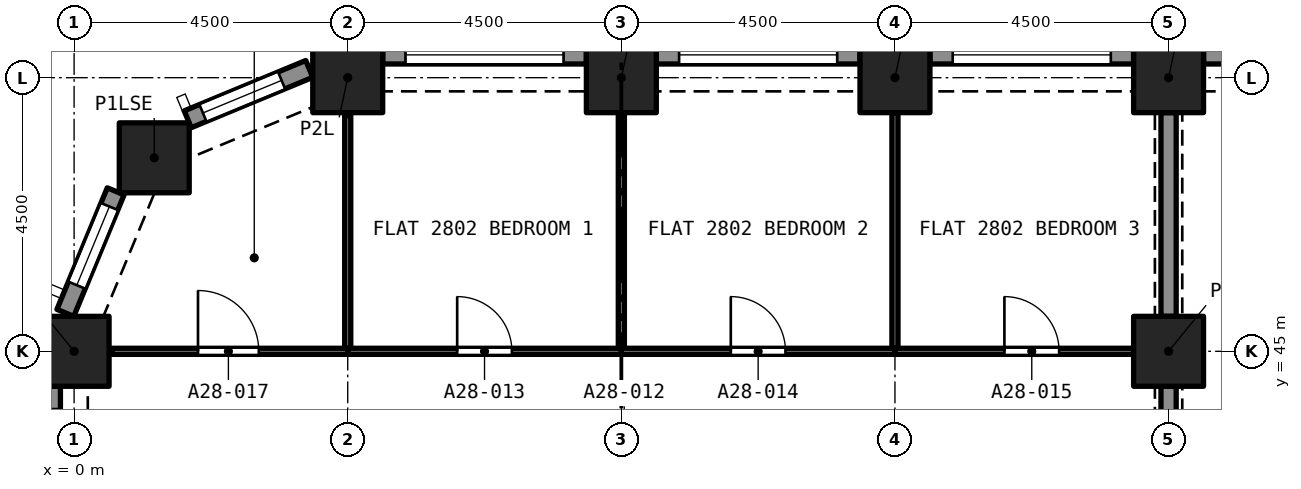
"""IFC4 building model, lengths in metres.
Left out: names, types, materials, properties, quantities, classifications, styles, units other than length and angle.
Written with IfcOpenShell. Run it as: python <this file> out.ifc"""

import sys

from ifc_helpers import new_model, si_unit, direction, frame, frame_2d, origin, origin_2d, place, context, subcontext, project, spatial, rectangle, extrude, element, fill, save


model = new_model("IFC4")
c1 = context("Model", 3, precision=1e-05, world=origin(), true_north=direction((0.0, 1.0)))
c2 = subcontext(c1, "Body", "Model", "MODEL_VIEW")
j1 = project(units=[si_unit("LENGTHUNIT", "METRE"), si_unit("PLANEANGLEUNIT", "RADIAN")], contexts=[c1])
p1 = place(None, origin())
s1 = spatial("IfcSite", under=j1, at=p1, CompositionType="ELEMENT")
p2 = place(p1, origin())
s2 = spatial("IfcBuilding", under=s1, at=p2, CompositionType="ELEMENT")
p3 = place(p2, frame((0.0, 0.0, 102.4)))
s3 = spatial("IfcBuildingStorey", under=s2, at=p3, CompositionType="ELEMENT", Elevation=102.4)
for number, where, z_axis, x_axis in (
    (1, (0.0, 45.0, 0.0), (0.0, 0.0, 1.0), (1.0, 0.0, 0.0)),
    (2, (18.0, 45.0, 0.0), (0.0, 0.0, 1.0), (1.0, 0.0, 0.0)),
    (3, (1.318, 48.182, 0.0), (0.0, 0.0, 1.0), (1.0, 0.0, 0.0)),
    (4, (4.5, 49.5, 0.0), (0.0, 0.0, 1.0), (1.0, 0.0, 0.0)),
    (5, (9.0, 49.5, 0.0), (0.0, 0.0, 1.0), (1.0, 0.0, 0.0)),
    (6, (13.5, 49.5, 0.0), (0.0, 0.0, 1.0), (1.0, 0.0, 0.0)),
    (7, (18.0, 49.5, 0.0), (0.0, 0.0, 1.0), (1.0, 0.0, 0.0)),
):
    element("IfcColumn", number, at=place(p3, frame(where, z_axis=z_axis, x_axis=x_axis)), inside=s3, PredefinedType="COLUMN", context=c2, shape_type="SweptSolid", body=[
        extrude(rectangle(XDim=1.15, YDim=1.15, at=origin_2d()), origin(), (0.0, 0.0, 1.0), 3.2),
    ])
p4 = place(p3, frame((18.575, 49.875, 0.0), z_axis=(0.0, 0.0, 1.0), x_axis=(1.0, 0.0, 0.0)))
e8 = element("IfcWall", 8, at=p4, inside=s3, PredefinedType="SOLIDWALL", context=c2, shape_type="SweptSolid", body=[
    extrude(rectangle(XDim=3.35, YDim=0.3, at=frame_2d((1.675, 0.0))), origin(), (0.0, 0.0, 1.0), 3.2),
])
p5 = place(p4, frame((0.375, 0.0, 0.45)))
e9 = element("IfcOpeningElement", 9, at=p5, cuts=e8, PredefinedType="OPENING", context=c2, shape_type="SweptSolid", body=[
    extrude(rectangle(XDim=2.6, YDim=1.95, at=frame_2d((1.3, 0.975))), frame((0.0, 0.16, 0.0), z_axis=(0.0, -1.0, 0.0), x_axis=(1.0, 0.0, 0.0)), (0.0, 0.0, 1.0), 0.32),
])
p6 = place(p3, frame((14.075, 49.875, 0.0), z_axis=(0.0, 0.0, 1.0), x_axis=(1.0, 0.0, 0.0)))
e10 = element("IfcWall", 10, at=p6, inside=s3, PredefinedType="SOLIDWALL", context=c2, shape_type="SweptSolid", body=[
    extrude(rectangle(XDim=3.35, YDim=0.3, at=frame_2d((1.675, 0.0))), origin(), (0.0, 0.0, 1.0), 3.2),
])
p7 = place(p6, frame((0.375, 0.0, 0.45)))
e11 = element("IfcOpeningElement", 11, at=p7, cuts=e10, PredefinedType="OPENING", context=c2, shape_type="SweptSolid", body=[
    extrude(rectangle(XDim=2.6, YDim=1.95, at=frame_2d((1.3, 0.975))), frame((0.0, 0.16, 0.0), z_axis=(0.0, -1.0, 0.0), x_axis=(1.0, 0.0, 0.0)), (0.0, 0.0, 1.0), 0.32),
])
p8 = place(p3, frame((9.575, 49.875, 0.0), z_axis=(0.0, 0.0, 1.0), x_axis=(1.0, 0.0, 0.0)))
e12 = element("IfcWall", 12, at=p8, inside=s3, PredefinedType="SOLIDWALL", context=c2, shape_type="SweptSolid", body=[
    extrude(rectangle(XDim=3.35, YDim=0.3, at=frame_2d((1.675, 0.0))), origin(), (0.0, 0.0, 1.0), 3.2),
])
p9 = place(p8, frame((0.375, 0.0, 0.45)))
e13 = element("IfcOpeningElement", 13, at=p9, cuts=e12, PredefinedType="OPENING", context=c2, shape_type="SweptSolid", body=[
    extrude(rectangle(XDim=2.6, YDim=1.95, at=frame_2d((1.3, 0.975))), frame((0.0, 0.16, 0.0), z_axis=(0.0, -1.0, 0.0), x_axis=(1.0, 0.0, 0.0)), (0.0, 0.0, 1.0), 0.32),
])
p10 = place(p3, frame((5.075, 49.875, 0.0), z_axis=(0.0, 0.0, 1.0), x_axis=(1.0, 0.0, 0.0)))
e14 = element("IfcWall", 14, at=p10, inside=s3, PredefinedType="SOLIDWALL", context=c2, shape_type="SweptSolid", body=[
    extrude(rectangle(XDim=3.35, YDim=0.3, at=frame_2d((1.675, 0.0))), origin(), (0.0, 0.0, 1.0), 3.2),
])
p11 = place(p10, frame((0.375, 0.0, 0.45)))
e15 = element("IfcOpeningElement", 15, at=p11, cuts=e14, PredefinedType="OPENING", context=c2, shape_type="SweptSolid", body=[
    extrude(rectangle(XDim=2.6, YDim=1.95, at=frame_2d((1.3, 0.975))), frame((0.0, 0.16, 0.0), z_axis=(0.0, -1.0, 0.0), x_axis=(1.0, 0.0, 0.0)), (0.0, 0.0, 1.0), 0.32),
])
p12 = place(p3, frame((1.869, 48.816, 0.0), z_axis=(0.0, 0.0, 1.0), x_axis=(0.923862802911, 0.382723818695, 0.0)))
e16 = element("IfcWall", 16, at=p12, inside=s3, PredefinedType="SOLIDWALL", context=c2, shape_type="SweptSolid", body=[
    extrude(rectangle(XDim=2.164, YDim=0.3, at=frame_2d((1.082, 0.0))), origin(), (0.0, 0.0, 1.0), 3.2),
])
p13 = place(p12, frame((0.271, 0.0, 0.45)))
e17 = element("IfcOpeningElement", 17, at=p13, cuts=e16, PredefinedType="OPENING", context=c2, shape_type="SweptSolid", body=[
    extrude(rectangle(XDim=1.4, YDim=1.95, at=frame_2d((0.7, 0.975))), frame((0.0, 0.16, 0.0), z_axis=(0.0, -1.0, 0.0), x_axis=(1.0, 0.0, 0.0)), (0.0, 0.0, 1.0), 0.32),
])
p14 = place(p3, frame((-0.144, 45.632, 0.0), z_axis=(0.0, 0.0, 1.0), x_axis=(0.382723818695, 0.923862802911, 0.0)))
e18 = element("IfcWall", 18, at=p14, inside=s3, PredefinedType="SOLIDWALL", context=c2, shape_type="SweptSolid", body=[
    extrude(rectangle(XDim=2.164, YDim=0.3, at=frame_2d((1.082, 0.0))), origin(), (0.0, 0.0, 1.0), 3.2),
])
p15 = place(p14, frame((0.493, 0.0, 0.45)))
e19 = element("IfcOpeningElement", 19, at=p15, cuts=e18, PredefinedType="OPENING", context=c2, shape_type="SweptSolid", body=[
    extrude(rectangle(XDim=1.4, YDim=1.95, at=frame_2d((0.7, 0.975))), frame((0.0, 0.16, 0.0), z_axis=(0.0, -1.0, 0.0), x_axis=(1.0, 0.0, 0.0)), (0.0, 0.0, 1.0), 0.32),
])
p16 = place(p3, frame((-0.375, 41.075, 0.0), z_axis=(0.0, 0.0, 1.0), x_axis=(0.0, 1.0, 0.0)))
e20 = element("IfcWall", 20, at=p16, inside=s3, PredefinedType="SOLIDWALL", context=c2, shape_type="SweptSolid", body=[
    extrude(rectangle(XDim=3.35, YDim=0.3, at=frame_2d((1.675, 0.0))), origin(), (0.0, 0.0, 1.0), 3.2),
])
p17 = place(p16, frame((0.375, 0.0, 0.45)))
e21 = element("IfcOpeningElement", 21, at=p17, cuts=e20, PredefinedType="OPENING", context=c2, shape_type="SweptSolid", body=[
    extrude(rectangle(XDim=2.6, YDim=1.95, at=frame_2d((1.3, 0.975))), frame((0.0, 0.16, 0.0), z_axis=(0.0, -1.0, 0.0), x_axis=(1.0, 0.0, 0.0)), (0.0, 0.0, 1.0), 0.32),
])
p18 = place(p3, frame((9.0, 45.05, 0.0), z_axis=(0.0, 0.0, 1.0), x_axis=(0.0, 1.0, 0.0)))
e22 = element("IfcWall", 22, at=p18, inside=s3, PredefinedType="PARTITIONING", context=c2, shape_type="SweptSolid", body=[
    extrude(rectangle(XDim=3.875, YDim=0.1, at=frame_2d((1.938, 0.0))), origin(), (0.0, 0.0, 1.0), 2.9),
])
p19 = place(p3, frame((4.5, 45.0, 0.0), z_axis=(0.0, 0.0, 1.0), x_axis=(1.0, 0.0, 0.0)))
e23 = element("IfcWall", 23, at=p19, inside=s3, PredefinedType="PARTITIONING", context=c2, shape_type="SweptSolid", body=[
    extrude(rectangle(XDim=4.5, YDim=0.1, at=frame_2d((2.25, 0.0))), origin(), (0.0, 0.0, 1.0), 2.9),
])
p20 = place(p19, frame((1.8, 0.0, 0.0)))
e24 = element("IfcOpeningElement", 24, at=p20, cuts=e23, PredefinedType="OPENING", context=c2, shape_type="SweptSolid", body=[
    extrude(rectangle(XDim=0.9, YDim=2.1, at=frame_2d((0.45, 1.05))), frame((0.0, 0.06, 0.0), z_axis=(0.0, -1.0, 0.0), x_axis=(1.0, 0.0, 0.0)), (0.0, 0.0, 1.0), 0.12),
])
p21 = place(p3, frame((4.5, 45.05, 0.0), z_axis=(0.0, 0.0, 1.0), x_axis=(0.0, 1.0, 0.0)))
e25 = element("IfcWall", 25, at=p21, inside=s3, PredefinedType="PARTITIONING", context=c2, shape_type="SweptSolid", body=[
    extrude(rectangle(XDim=3.828, YDim=0.1, at=frame_2d((1.914, 0.0))), origin(), (0.0, 0.0, 1.0), 2.9),
])
p22 = place(p3, frame((13.5, 45.05, 0.0), z_axis=(0.0, 0.0, 1.0), x_axis=(0.0, 1.0, 0.0)))
e26 = element("IfcWall", 26, at=p22, inside=s3, PredefinedType="PARTITIONING", context=c2, shape_type="SweptSolid", body=[
    extrude(rectangle(XDim=3.875, YDim=0.1, at=frame_2d((1.938, 0.0))), origin(), (0.0, 0.0, 1.0), 2.9),
])
p23 = place(p3, frame((9.0, 45.0, 0.0), z_axis=(0.0, 0.0, 1.0), x_axis=(1.0, 0.0, 0.0)))
e27 = element("IfcWall", 27, at=p23, inside=s3, PredefinedType="PARTITIONING", context=c2, shape_type="SweptSolid", body=[
    extrude(rectangle(XDim=4.5, YDim=0.1, at=frame_2d((2.25, 0.0))), origin(), (0.0, 0.0, 1.0), 2.9),
])
p24 = place(p23, frame((1.8, 0.0, 0.0)))
e28 = element("IfcOpeningElement", 28, at=p24, cuts=e27, PredefinedType="OPENING", context=c2, shape_type="SweptSolid", body=[
    extrude(rectangle(XDim=0.9, YDim=2.1, at=frame_2d((0.45, 1.05))), frame((0.0, 0.06, 0.0), z_axis=(0.0, -1.0, 0.0), x_axis=(1.0, 0.0, 0.0)), (0.0, 0.0, 1.0), 0.12),
])
p25 = place(p3, frame((13.5, 45.0, 0.0), z_axis=(0.0, 0.0, 1.0), x_axis=(1.0, 0.0, 0.0)))
e29 = element("IfcWall", 29, at=p25, inside=s3, PredefinedType="PARTITIONING", context=c2, shape_type="SweptSolid", body=[
    extrude(rectangle(XDim=3.925, YDim=0.1, at=frame_2d((1.962, 0.0))), origin(), (0.0, 0.0, 1.0), 2.9),
])
p26 = place(p25, frame((1.8, 0.0, 0.0)))
e30 = element("IfcOpeningElement", 30, at=p26, cuts=e29, PredefinedType="OPENING", context=c2, shape_type="SweptSolid", body=[
    extrude(rectangle(XDim=0.9, YDim=2.1, at=frame_2d((0.45, 1.05))), frame((0.0, 0.06, 0.0), z_axis=(0.0, -1.0, 0.0), x_axis=(1.0, 0.0, 0.0)), (0.0, 0.0, 1.0), 0.12),
])
p27 = place(p3, frame((18.0, 45.575, 0.0), z_axis=(0.0, 0.0, 1.0), x_axis=(0.0, 1.0, 0.0)))
e31 = element("IfcWall", 31, at=p27, inside=s3, PredefinedType="PARTITIONING", context=c2, shape_type="SweptSolid", body=[
    extrude(rectangle(XDim=3.35, YDim=0.25, at=frame_2d((1.675, 0.0))), origin(), (0.0, 0.0, 1.0), 2.38),
])
p28 = place(p3, frame((0.622, 45.0, 0.0), z_axis=(0.0, 0.0, 1.0), x_axis=(1.0, 0.0, 0.0)))
e32 = element("IfcWall", 32, at=p28, inside=s3, PredefinedType="PARTITIONING", context=c2, shape_type="SweptSolid", body=[
    extrude(rectangle(XDim=3.878, YDim=0.1, at=frame_2d((1.939, 0.0))), origin(), (0.0, 0.0, 1.0), 2.9),
])
p29 = place(p28, frame((1.415, 0.0, 0.0)))
e33 = element("IfcOpeningElement", 33, at=p29, cuts=e32, PredefinedType="OPENING", context=c2, shape_type="SweptSolid", body=[
    extrude(rectangle(XDim=1.0, YDim=2.1, at=frame_2d((0.5, 1.05))), frame((0.0, 0.06, 0.0), z_axis=(0.0, -1.0, 0.0), x_axis=(1.0, 0.0, 0.0)), (0.0, 0.0, 1.0), 0.12),
])
p30 = place(p3, frame((18.0, 41.075, 0.0), z_axis=(0.0, 0.0, 1.0), x_axis=(0.0, 1.0, 0.0)))
e34 = element("IfcWall", 34, at=p30, inside=s3, PredefinedType="PARTITIONING", context=c2, shape_type="SweptSolid", body=[
    extrude(rectangle(XDim=3.35, YDim=0.25, at=frame_2d((1.675, 0.0))), origin(), (0.0, 0.0, 1.0), 2.38),
])
p31 = place(p7, origin())
e35 = element("IfcWindow", 35, at=p31, inside=s3, PartitioningType="SINGLE_PANEL", PredefinedType="WINDOW", context=c2, shape_type="SweptSolid", body=[
    extrude(rectangle(XDim=2.6, YDim=1.95, at=frame_2d((1.3, 0.975))), frame((0.0, 0.03, 0.0), z_axis=(0.0, -1.0, 0.0), x_axis=(1.0, 0.0, 0.0)), (0.0, 0.0, 1.0), 0.06),
])
fill(e11, e35)
p32 = place(p9, origin())
e36 = element("IfcWindow", 36, at=p32, inside=s3, PartitioningType="SINGLE_PANEL", PredefinedType="WINDOW", context=c2, shape_type="SweptSolid", body=[
    extrude(rectangle(XDim=2.6, YDim=1.95, at=frame_2d((1.3, 0.975))), frame((0.0, 0.03, 0.0), z_axis=(0.0, -1.0, 0.0), x_axis=(1.0, 0.0, 0.0)), (0.0, 0.0, 1.0), 0.06),
])
fill(e13, e36)
p33 = place(p11, origin())
e37 = element("IfcWindow", 37, at=p33, inside=s3, PartitioningType="SINGLE_PANEL", PredefinedType="WINDOW", context=c2, shape_type="SweptSolid", body=[
    extrude(rectangle(XDim=2.6, YDim=1.95, at=frame_2d((1.3, 0.975))), frame((0.0, 0.03, 0.0), z_axis=(0.0, -1.0, 0.0), x_axis=(1.0, 0.0, 0.0)), (0.0, 0.0, 1.0), 0.06),
])
fill(e15, e37)
p34 = place(p13, origin())
e38 = element("IfcWindow", 38, at=p34, inside=s3, PartitioningType="SINGLE_PANEL", PredefinedType="WINDOW", context=c2, shape_type="SweptSolid", body=[
    extrude(rectangle(XDim=1.4, YDim=1.95, at=frame_2d((0.7, 0.975))), frame((0.0, 0.03, 0.0), z_axis=(0.0, -1.0, 0.0), x_axis=(1.0, 0.0, 0.0)), (0.0, 0.0, 1.0), 0.06),
])
fill(e17, e38)
p35 = place(p15, origin())
e39 = element("IfcWindow", 39, at=p35, inside=s3, PartitioningType="SINGLE_PANEL", PredefinedType="WINDOW", context=c2, shape_type="SweptSolid", body=[
    extrude(rectangle(XDim=1.4, YDim=1.95, at=frame_2d((0.7, 0.975))), frame((0.0, 0.03, 0.0), z_axis=(0.0, -1.0, 0.0), x_axis=(1.0, 0.0, 0.0)), (0.0, 0.0, 1.0), 0.06),
])
fill(e19, e39)
p36 = place(p20, origin())
e40 = element("IfcDoor", 40, at=p36, inside=s3, OperationType="SINGLE_SWING_RIGHT", PredefinedType="DOOR", context=c2, shape_type="SweptSolid", body=[
    extrude(rectangle(XDim=0.9, YDim=2.1, at=frame_2d((0.45, 1.05))), frame((0.0, 0.025, 0.0), z_axis=(0.0, -1.0, 0.0), x_axis=(1.0, 0.0, 0.0)), (0.0, 0.0, 1.0), 0.05),
])
fill(e24, e40)
p37 = place(p24, origin())
e41 = element("IfcDoor", 41, at=p37, inside=s3, OperationType="SINGLE_SWING_LEFT", PredefinedType="DOOR", context=c2, shape_type="SweptSolid", body=[
    extrude(rectangle(XDim=0.9, YDim=2.1, at=frame_2d((0.45, 1.05))), frame((0.0, 0.025, 0.0), z_axis=(0.0, -1.0, 0.0), x_axis=(1.0, 0.0, 0.0)), (0.0, 0.0, 1.0), 0.05),
])
fill(e28, e41)
p38 = place(p26, origin())
e42 = element("IfcDoor", 42, at=p38, inside=s3, OperationType="SINGLE_SWING_RIGHT", PredefinedType="DOOR", context=c2, shape_type="SweptSolid", body=[
    extrude(rectangle(XDim=0.9, YDim=2.1, at=frame_2d((0.45, 1.05))), frame((0.0, 0.025, 0.0), z_axis=(0.0, -1.0, 0.0), x_axis=(1.0, 0.0, 0.0)), (0.0, 0.0, 1.0), 0.05),
])
fill(e30, e42)
p39 = place(p29, origin())
e43 = element("IfcDoor", 43, at=p39, inside=s3, OperationType="SINGLE_SWING_LEFT", PredefinedType="DOOR", context=c2, shape_type="SweptSolid", body=[
    extrude(rectangle(XDim=1.0, YDim=2.1, at=frame_2d((0.5, 1.05))), frame((0.0, 0.025, 0.0), z_axis=(0.0, -1.0, 0.0), x_axis=(1.0, 0.0, 0.0)), (0.0, 0.0, 1.0), 0.05),
])
fill(e33, e43)
save(model, sys.argv[1])
